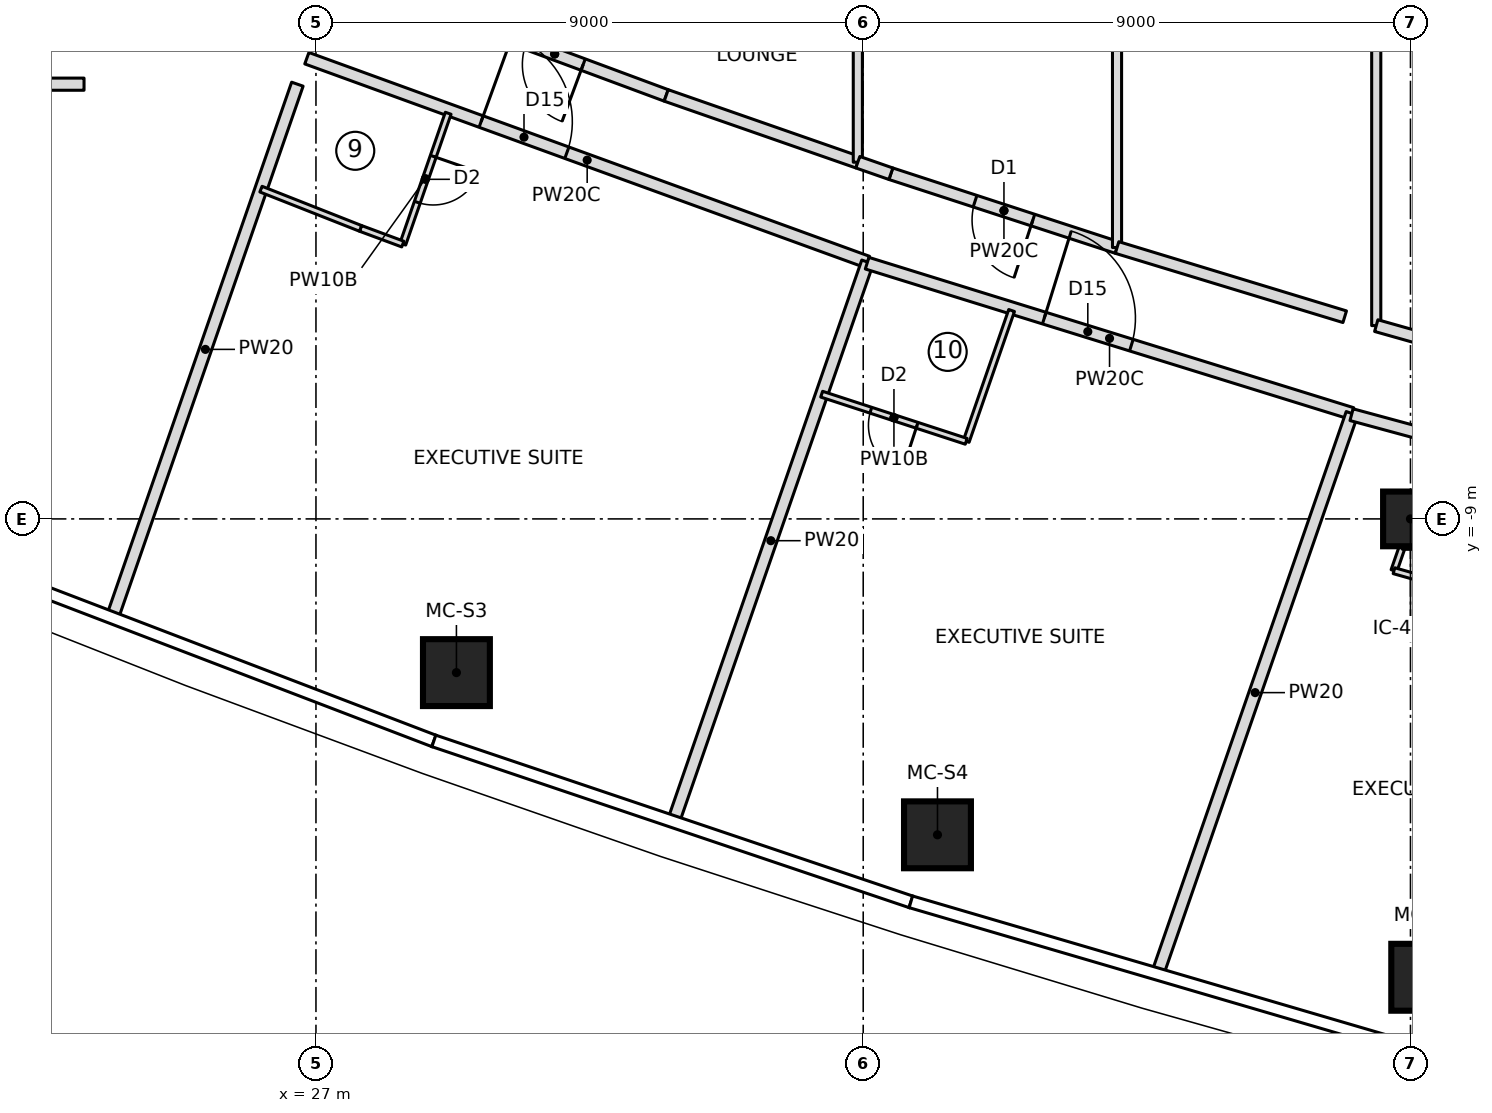
"""IFC4 building model, lengths in metres.
Left out: names, types, materials, properties, quantities, classifications, styles, units other than length and angle.
Written with IfcOpenShell. Run it as: python <this file> out.ifc"""

import sys

from ifc_helpers import new_model, si_unit, direction, frame, frame_2d, origin, origin_2d, place, context, subcontext, project, spatial, rectangle, extrude, element, fill, save


model = new_model("IFC4")
c1 = context("Model", 3, precision=1e-05, world=origin(), true_north=direction((0.0, 1.0)))
c2 = subcontext(c1, "Body", "Model", "MODEL_VIEW")
j1 = project(units=[si_unit("LENGTHUNIT", "METRE"), si_unit("PLANEANGLEUNIT", "RADIAN")], contexts=[c1])
p1 = place(None, origin())
s1 = spatial("IfcSite", under=j1, at=p1, CompositionType="ELEMENT")
p2 = place(p1, origin())
s2 = spatial("IfcBuilding", under=s1, at=p2, CompositionType="ELEMENT")
p3 = place(p2, frame((0.0, 0.0, 292.75)))
s3 = spatial("IfcBuildingStorey", under=s2, at=p3, CompositionType="ELEMENT", Elevation=292.75)
for number, where, z_axis, x_axis in (
    (1, (29.31, -11.528, 0.0), (0.0, 0.0, 1.0), (1.0, 0.0, 0.0)),
    (2, (37.221, -14.196, 0.0), (0.0, 0.0, 1.0), (1.0, 0.0, 0.0)),
    (3, (45.235, -16.539, 0.0), (0.0, 0.0, 1.0), (1.0, 0.0, 0.0)),
):
    element("IfcColumn", number, at=place(p3, frame(where, z_axis=z_axis, x_axis=x_axis)), inside=s3, PredefinedType="COLUMN", context=c2, shape_type="SweptSolid", body=[
        extrude(rectangle(XDim=1.1, YDim=1.1, at=origin_2d()), origin(), (0.0, 0.0, 1.0), 3.55),
    ])
p4 = place(p3, frame((45.0, -9.0, 0.0), z_axis=(0.0, 0.0, 1.0), x_axis=(1.0, 0.0, 0.0)))
e4 = element("IfcColumn", 4, at=p4, inside=s3, PredefinedType="COLUMN", context=c2, shape_type="SweptSolid", body=[
    extrude(rectangle(XDim=0.9, YDim=0.9, at=origin_2d()), origin(), (0.0, 0.0, 1.0), 3.55),
])
p5 = place(p3, frame((7.287, -1.85, 0.0), z_axis=(0.0, 0.0, 1.0), x_axis=(1.0, 0.0, 0.0)))
e5 = element("IfcWall", 5, at=p5, inside=s3, PredefinedType="PARTITIONING", context=c2, shape_type="SweptSolid", body=[
    extrude(rectangle(XDim=15.899, YDim=0.2, at=frame_2d((7.949, 0.0))), origin(), (0.0, 0.0, 1.0), 3.25),
])
p6 = place(p5, frame((7.624, 0.0, 0.0)))
e6 = element("IfcOpeningElement", 6, at=p6, cuts=e5, PredefinedType="OPENING", context=c2, shape_type="SweptSolid", body=[
    extrude(rectangle(XDim=1.0, YDim=2.1, at=frame_2d((0.5, 1.05))), frame((0.0, 0.11, 0.0), z_axis=(0.0, -1.0, 0.0), x_axis=(1.0, 0.0, 0.0)), (0.0, 0.0, 1.0), 0.22),
])
p7 = place(p3, frame((23.668, -10.573, 0.0), z_axis=(0.0, 0.0, 1.0), x_axis=(0.327714422317, 0.944776829418, 0.0)))
e7 = element("IfcWall", 7, at=p7, inside=s3, PredefinedType="PARTITIONING", context=c2, shape_type="SweptSolid", body=[
    extrude(rectangle(XDim=9.233, YDim=0.2, at=frame_2d((4.617, 0.0))), origin(), (0.0, 0.0, 1.0), 3.25),
])
p8 = place(p3, frame((26.85, -1.423, 0.0), z_axis=(0.0, 0.0, 1.0), x_axis=(0.939807953272, -0.341703103536, 0.0)))
e8 = element("IfcWall", 8, at=p8, inside=s3, PredefinedType="PARTITIONING", context=c2, shape_type="SweptSolid", body=[
    extrude(rectangle(XDim=9.811, YDim=0.2, at=frame_2d((4.906, 0.0))), origin(), (0.0, 0.0, 1.0), 3.25),
])
p9 = place(p8, frame((3.05, 0.0, 0.0)))
e9 = element("IfcOpeningElement", 9, at=p9, cuts=e8, PredefinedType="OPENING", context=c2, shape_type="SweptSolid", body=[
    extrude(rectangle(XDim=1.5, YDim=2.1, at=frame_2d((0.75, 1.05))), frame((0.0, 0.11, 0.0), z_axis=(0.0, -1.0, 0.0), x_axis=(1.0, 0.0, 0.0)), (0.0, 0.0, 1.0), 0.22),
])
p10 = place(p3, frame((29.175, -2.328, 0.0), z_axis=(0.0, 0.0, 1.0), x_axis=(-0.327718024288, -0.944775579996, 0.0)))
e10 = element("IfcWall", 10, at=p10, inside=s3, PredefinedType="PARTITIONING", context=c2, shape_type="SweptSolid", body=[
    extrude(rectangle(XDim=2.277, YDim=0.1, at=frame_2d((1.139, 0.0))), origin(), (0.0, 0.0, 1.0), 3.25),
])
p11 = place(p10, frame((0.75, 0.0, 0.0)))
e11 = element("IfcOpeningElement", 11, at=p11, cuts=e10, PredefinedType="OPENING", context=c2, shape_type="SweptSolid", body=[
    extrude(rectangle(XDim=0.8, YDim=2.1, at=frame_2d((0.4, 1.05))), frame((0.0, 0.06, 0.0), z_axis=(0.0, -1.0, 0.0), x_axis=(1.0, 0.0, 0.0)), (0.0, 0.0, 1.0), 0.12),
])
p12 = place(p3, frame((28.428, -4.48, 0.0), z_axis=(0.0, 0.0, 1.0), x_axis=(-0.937514267289, 0.347946833049, 0.0)))
e12 = element("IfcWall", 12, at=p12, inside=s3, PredefinedType="PARTITIONING", context=c2, shape_type="SweptSolid", body=[
    extrude(rectangle(XDim=0.742, YDim=0.1, at=frame_2d((0.371, 0.0))), origin(), (0.0, 0.0, 1.0), 3.25),
])
p13 = place(p3, frame((27.733, -4.222, 0.0), z_axis=(0.0, 0.0, 1.0), x_axis=(-0.930254925629, 0.366913850028, 0.0)))
e13 = element("IfcWall", 13, at=p13, inside=s3, PredefinedType="PARTITIONING", context=c2, shape_type="SweptSolid", body=[
    extrude(rectangle(XDim=1.76, YDim=0.1, at=frame_2d((0.88, 0.0))), origin(), (0.0, 0.0, 1.0), 3.25),
])
p14 = place(p3, frame((32.891, -13.941, 0.0), z_axis=(0.0, 0.0, 1.0), x_axis=(0.327725028322, 0.94477315045, 0.0)))
e14 = element("IfcWall", 14, at=p14, inside=s3, PredefinedType="PARTITIONING", context=c2, shape_type="SweptSolid", body=[
    extrude(rectangle(XDim=9.702, YDim=0.2, at=frame_2d((4.851, 0.0))), origin(), (0.0, 0.0, 1.0), 3.25),
])
p15 = place(p3, frame((36.064, -4.794, 0.0), z_axis=(0.0, 0.0, 1.0), x_axis=(0.955129200503, -0.296189483855, 0.0)))
e15 = element("IfcWall", 15, at=p15, inside=s3, PredefinedType="PARTITIONING", context=c2, shape_type="SweptSolid", body=[
    extrude(rectangle(XDim=8.348, YDim=0.2, at=frame_2d((4.174, 0.0))), origin(), (0.0, 0.0, 1.0), 3.25),
])
p16 = place(p15, frame((3.05, 0.0, 0.0)))
e16 = element("IfcOpeningElement", 16, at=p16, cuts=e15, PredefinedType="OPENING", context=c2, shape_type="SweptSolid", body=[
    extrude(rectangle(XDim=1.5, YDim=2.1, at=frame_2d((0.75, 1.05))), frame((0.0, 0.11, 0.0), z_axis=(0.0, -1.0, 0.0), x_axis=(1.0, 0.0, 0.0)), (0.0, 0.0, 1.0), 0.22),
])
p17 = place(p3, frame((38.44, -5.573, 0.0), z_axis=(0.0, 0.0, 1.0), x_axis=(-0.327622330203, -0.944808768351, 0.0)))
e17 = element("IfcWall", 17, at=p17, inside=s3, PredefinedType="PARTITIONING", context=c2, shape_type="SweptSolid", body=[
    extrude(rectangle(XDim=2.277, YDim=0.1, at=frame_2d((1.139, 0.0))), origin(), (0.0, 0.0, 1.0), 3.25),
])
p18 = place(p3, frame((37.694, -7.724, 0.0), z_axis=(0.0, 0.0, 1.0), x_axis=(-0.950666002187, 0.310216299194, 0.0)))
e18 = element("IfcWall", 18, at=p18, inside=s3, PredefinedType="PARTITIONING", context=c2, shape_type="SweptSolid", body=[
    extrude(rectangle(XDim=2.5, YDim=0.1, at=frame_2d((1.25, 0.0))), origin(), (0.0, 0.0, 1.0), 3.25),
])
p19 = place(p18, frame((0.85, 0.0, 0.0)))
e19 = element("IfcOpeningElement", 19, at=p19, cuts=e18, PredefinedType="OPENING", context=c2, shape_type="SweptSolid", body=[
    extrude(rectangle(XDim=0.8, YDim=2.1, at=frame_2d((0.4, 1.05))), frame((0.0, 0.06, 0.0), z_axis=(0.0, -1.0, 0.0), x_axis=(1.0, 0.0, 0.0)), (0.0, 0.0, 1.0), 0.12),
])
p20 = place(p3, frame((40.854, -16.447, 0.0), z_axis=(0.0, 0.0, 1.0), x_axis=(0.327714576096, 0.944776776077, 0.0)))
e20 = element("IfcWall", 20, at=p20, inside=s3, PredefinedType="PARTITIONING", context=c2, shape_type="SweptSolid", body=[
    extrude(rectangle(XDim=9.717, YDim=0.2, at=frame_2d((4.858, 0.0))), origin(), (0.0, 0.0, 1.0), 3.25),
])
p21 = place(p3, frame((44.729, -9.852, 0.0), z_axis=(0.0, 0.0, 1.0), x_axis=(0.327741335839, 0.944767493504, 0.0)))
e21 = element("IfcWall", 21, at=p21, inside=s3, PredefinedType="PARTITIONING", context=c2, shape_type="SweptSolid", body=[
    extrude(rectangle(XDim=0.425, YDim=0.1, at=frame_2d((0.213, 0.0))), origin(), (0.0, 0.0, 1.0), 3.25),
])
p22 = place(p3, frame((44.868, -9.45, 0.0), z_axis=(0.0, 0.0, 1.0), x_axis=(1.0, 0.0, 0.0)))
e22 = element("IfcWall", 22, at=p22, inside=s3, PredefinedType="PARTITIONING", context=c2, shape_type="SweptSolid", body=[
    extrude(rectangle(XDim=0.58, YDim=0.1, at=frame_2d((0.29, 0.0))), origin(), (0.0, 0.0, 1.0), 3.25),
])
p23 = place(p3, frame((46.689, -10.405, 0.0), z_axis=(0.0, 0.0, 1.0), x_axis=(-0.962405498185, 0.271616746654, 0.0)))
e23 = element("IfcWall", 23, at=p23, inside=s3, PredefinedType="PARTITIONING", context=c2, shape_type="SweptSolid", body=[
    extrude(rectangle(XDim=2.037, YDim=0.1, at=frame_2d((1.019, 0.0))), origin(), (0.0, 0.0, 1.0), 3.25),
])
p24 = place(p3, frame((32.76, -2.035, 0.0), z_axis=(0.0, 0.0, 1.0), x_axis=(-0.937460178932, 0.348092534992, 0.0)))
e24 = element("IfcWall", 24, at=p24, inside=s3, PredefinedType="PARTITIONING", context=c2, shape_type="SweptSolid", body=[
    extrude(rectangle(XDim=3.913, YDim=0.2, at=frame_2d((1.957, 0.0))), origin(), (0.0, 0.0, 1.0), 3.25),
])
p25 = place(p24, frame((1.457, 0.0, 0.0)))
e25 = element("IfcOpeningElement", 25, at=p25, cuts=e24, PredefinedType="OPENING", context=c2, shape_type="SweptSolid", body=[
    extrude(rectangle(XDim=1.0, YDim=2.1, at=frame_2d((0.5, 1.05))), frame((0.0, 0.11, 0.0), z_axis=(0.0, -1.0, 0.0), x_axis=(1.0, 0.0, 0.0)), (0.0, 0.0, 1.0), 0.22),
])
p26 = place(p3, frame((35.911, -3.133, 0.0), z_axis=(0.0, 0.0, 1.0), x_axis=(-0.944294313876, 0.329102185927, 0.0)))
e26 = element("IfcWall", 26, at=p26, inside=s3, PredefinedType="PARTITIONING", context=c2, shape_type="SweptSolid", body=[
    extrude(rectangle(XDim=3.338, YDim=0.2, at=frame_2d((1.669, 0.0))), origin(), (0.0, 0.0, 1.0), 3.25),
])
p27 = place(p3, frame((35.911, -3.133, 0.0), z_axis=(0.0, 0.0, 1.0), x_axis=(0.0, 1.0, 0.0)))
e27 = element("IfcWall", 27, at=p27, inside=s3, PredefinedType="PARTITIONING", context=c2, shape_type="SweptSolid", body=[
    extrude(rectangle(XDim=6.267, YDim=0.15, at=frame_2d((3.133, 0.0))), origin(), (0.0, 0.0, 1.0), 3.25),
])
p28 = place(p3, frame((40.174, -4.536, 0.0), z_axis=(0.0, 0.0, 1.0), x_axis=(-0.950716244522, 0.310062287938, 0.0)))
e28 = element("IfcWall", 28, at=p28, inside=s3, PredefinedType="PARTITIONING", context=c2, shape_type="SweptSolid", body=[
    extrude(rectangle(XDim=3.913, YDim=0.2, at=frame_2d((1.956, 0.0))), origin(), (0.0, 0.0, 1.0), 3.25),
])
p29 = place(p28, frame((1.456, 0.0, 0.0)))
e29 = element("IfcOpeningElement", 29, at=p29, cuts=e28, PredefinedType="OPENING", context=c2, shape_type="SweptSolid", body=[
    extrude(rectangle(XDim=1.0, YDim=2.1, at=frame_2d((0.5, 1.05))), frame((0.0, 0.11, 0.0), z_axis=(0.0, -1.0, 0.0), x_axis=(1.0, 0.0, 0.0)), (0.0, 0.0, 1.0), 0.22),
])
p30 = place(p3, frame((40.174, -4.536, 0.0), z_axis=(0.0, 0.0, 1.0), x_axis=(0.0, 1.0, 0.0)))
e30 = element("IfcWall", 30, at=p30, inside=s3, PredefinedType="PARTITIONING", context=c2, shape_type="SweptSolid", body=[
    extrude(rectangle(XDim=9.072, YDim=0.15, at=frame_2d((4.536, 0.0))), origin(), (0.0, 0.0, 1.0), 3.25),
])
p31 = place(p3, frame((43.918, -5.675, 0.0), z_axis=(0.0, 0.0, 1.0), x_axis=(-0.956723737069, 0.29099775073, 0.0)))
e31 = element("IfcWall", 31, at=p31, inside=s3, PredefinedType="PARTITIONING", context=c2, shape_type="SweptSolid", body=[
    extrude(rectangle(XDim=3.913, YDim=0.2, at=frame_2d((1.957, 0.0))), origin(), (0.0, 0.0, 1.0), 3.25),
])
p32 = place(p3, frame((44.437, -5.821, 0.0), z_axis=(0.0, 0.0, 1.0), x_axis=(0.0, 1.0, 0.0)))
e32 = element("IfcWall", 32, at=p32, inside=s3, PredefinedType="PARTITIONING", context=c2, shape_type="SweptSolid", body=[
    extrude(rectangle(XDim=11.642, YDim=0.15, at=frame_2d((5.821, 0.0))), origin(), (0.0, 0.0, 1.0), 3.25),
])
p33 = place(p3, frame((47.684, -6.738, 0.0), z_axis=(0.0, 0.0, 1.0), x_axis=(-0.962403613575, 0.271623424206, 0.0)))
e33 = element("IfcWall", 33, at=p33, inside=s3, PredefinedType="PARTITIONING", context=c2, shape_type="SweptSolid", body=[
    extrude(rectangle(XDim=3.374, YDim=0.2, at=frame_2d((1.687, 0.0))), origin(), (0.0, 0.0, 1.0), 3.25),
])
p34 = place(p33, frame((1.187, 0.0, 0.0)))
e34 = element("IfcOpeningElement", 34, at=p34, cuts=e33, PredefinedType="OPENING", context=c2, shape_type="SweptSolid", body=[
    extrude(rectangle(XDim=1.0, YDim=2.1, at=frame_2d((0.5, 1.05))), frame((0.0, 0.11, 0.0), z_axis=(0.0, -1.0, 0.0), x_axis=(1.0, 0.0, 0.0)), (0.0, 0.0, 1.0), 0.22),
])
p35 = place(p3, frame((44.031, -7.286, 0.0), z_axis=(0.0, 0.0, 1.0), x_axis=(0.965107760304, -0.261853033211, 0.0)))
e35 = element("IfcWall", 35, at=p35, inside=s3, PredefinedType="PARTITIONING", context=c2, shape_type="SweptSolid", body=[
    extrude(rectangle(XDim=4.527, YDim=0.2, at=frame_2d((2.263, 0.0))), origin(), (0.0, 0.0, 1.0), 3.25),
])
p36 = place(p35, frame((1.851, 0.0, 0.0)))
e36 = element("IfcOpeningElement", 36, at=p36, cuts=e35, PredefinedType="OPENING", context=c2, shape_type="SweptSolid", body=[
    extrude(rectangle(XDim=1.5, YDim=2.1, at=frame_2d((0.75, 1.05))), frame((0.0, 0.11, 0.0), z_axis=(0.0, -1.0, 0.0), x_axis=(1.0, 0.0, 0.0)), (0.0, 0.0, 1.0), 0.22),
])
p37 = place(p3, frame((36.455, -3.323, 0.0), z_axis=(0.0, 0.0, 1.0), x_axis=(-0.9442216639, 0.329310566825, 0.0)))
e37 = element("IfcWall", 37, at=p37, inside=s3, PredefinedType="PARTITIONING", context=c2, shape_type="SweptSolid", body=[
    extrude(rectangle(XDim=0.575, YDim=0.2, at=frame_2d((0.288, 0.0))), origin(), (0.0, 0.0, 1.0), 3.25),
])
p38 = place(p11, origin())
e38 = element("IfcDoor", 38, at=p38, inside=s3, OperationType="SINGLE_SWING_LEFT", PredefinedType="DOOR", context=c2, shape_type="SweptSolid", body=[
    extrude(rectangle(XDim=0.8, YDim=2.1, at=frame_2d((0.4, 1.05))), frame((0.0, 0.025, 0.0), z_axis=(0.0, -1.0, 0.0), x_axis=(1.0, 0.0, 0.0)), (0.0, 0.0, 1.0), 0.05),
])
fill(e11, e38)
p39 = place(p9, origin())
e39 = element("IfcDoor", 39, at=p39, inside=s3, OperationType="DOUBLE_DOOR_SINGLE_SWING", PredefinedType="DOOR", context=c2, shape_type="SweptSolid", body=[
    extrude(rectangle(XDim=1.5, YDim=2.1, at=frame_2d((0.75, 1.05))), frame((0.0, 0.025, 0.0), z_axis=(0.0, -1.0, 0.0), x_axis=(1.0, 0.0, 0.0)), (0.0, 0.0, 1.0), 0.05),
])
fill(e9, e39)
p40 = place(p19, origin())
e40 = element("IfcDoor", 40, at=p40, inside=s3, OperationType="SINGLE_SWING_LEFT", PredefinedType="DOOR", context=c2, shape_type="SweptSolid", body=[
    extrude(rectangle(XDim=0.8, YDim=2.1, at=frame_2d((0.4, 1.05))), frame((0.0, 0.025, 0.0), z_axis=(0.0, -1.0, 0.0), x_axis=(1.0, 0.0, 0.0)), (0.0, 0.0, 1.0), 0.05),
])
fill(e19, e40)
p41 = place(p16, origin())
e41 = element("IfcDoor", 41, at=p41, inside=s3, OperationType="DOUBLE_DOOR_SINGLE_SWING", PredefinedType="DOOR", context=c2, shape_type="SweptSolid", body=[
    extrude(rectangle(XDim=1.5, YDim=2.1, at=frame_2d((0.75, 1.05))), frame((0.0, 0.025, 0.0), z_axis=(0.0, -1.0, 0.0), x_axis=(1.0, 0.0, 0.0)), (0.0, 0.0, 1.0), 0.05),
])
fill(e16, e41)
p42 = place(p25, origin())
e42 = element("IfcDoor", 42, at=p42, inside=s3, OperationType="SINGLE_SWING_RIGHT", PredefinedType="DOOR", context=c2, shape_type="SweptSolid", body=[
    extrude(rectangle(XDim=1.0, YDim=2.1, at=frame_2d((0.5, 1.05))), frame((0.0, 0.025, 0.0), z_axis=(0.0, -1.0, 0.0), x_axis=(1.0, 0.0, 0.0)), (0.0, 0.0, 1.0), 0.05),
])
fill(e25, e42)
p43 = place(p29, origin())
e43 = element("IfcDoor", 43, at=p43, inside=s3, OperationType="SINGLE_SWING_LEFT", PredefinedType="DOOR", context=c2, shape_type="SweptSolid", body=[
    extrude(rectangle(XDim=1.0, YDim=2.1, at=frame_2d((0.5, 1.05))), frame((0.0, 0.025, 0.0), z_axis=(0.0, -1.0, 0.0), x_axis=(1.0, 0.0, 0.0)), (0.0, 0.0, 1.0), 0.05),
])
fill(e29, e43)
save(model, sys.argv[1])
